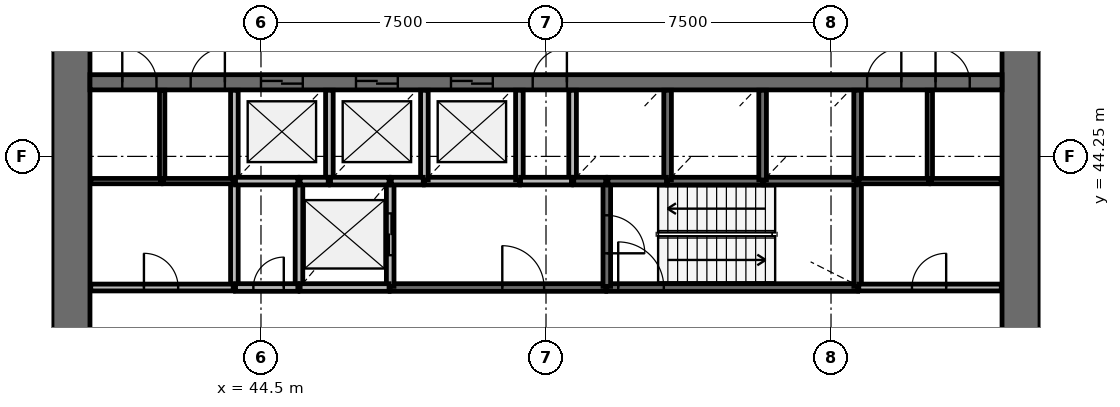
"""IFC4 building model, lengths in metres.
Left out: names, types, materials, properties, quantities, classifications, styles, units other than length and angle.
Written with IfcOpenShell. Run it as: python <this file> out.ifc"""

import sys

from ifc_helpers import new_model, si_unit, direction, frame, frame_2d, origin, place, context, subcontext, project, spatial, rectangle, extrude, source, transform, mapped, element, fill, save


model = new_model("IFC4")
c1 = context("Model", 3, precision=1e-05, world=origin(), true_north=direction((0.0, 1.0)))
c2 = subcontext(c1, "Body", "Model", "MODEL_VIEW")
j1 = project(units=[si_unit("LENGTHUNIT", "METRE"), si_unit("PLANEANGLEUNIT", "RADIAN")], contexts=[c1])
p1 = place(None, origin())
s1 = spatial("IfcSite", under=j1, at=p1, CompositionType="ELEMENT")
p2 = place(p1, origin())
s2 = spatial("IfcBuilding", under=s1, at=p2, CompositionType="ELEMENT")
p3 = place(p2, frame((0.0, 0.0, 27.0)))
s3 = spatial("IfcBuildingStorey", under=s2, at=p3, CompositionType="ELEMENT", Elevation=27.0)
p4 = place(p3, frame((64.5, 38.0, 0.0), z_axis=(0.0, 0.0, 1.0), x_axis=(0.0, 1.0, 0.0)))
e1 = element("IfcWall", 1, at=p4, inside=s3, PredefinedType="SHEAR", context=c2, shape_type="SweptSolid", body=[
    extrude(rectangle(XDim=20.0, YDim=1.0, at=frame_2d((10.0, 0.0))), origin(), (0.0, 0.0, 1.0), 4.4),
])
p5 = place(p4, frame((9.1, 0.0, 0.0)))
e2 = element("IfcOpeningElement", 2, at=p5, cuts=e1, PredefinedType="OPENING", context=c2, shape_type="SweptSolid", body=[
    extrude(rectangle(XDim=1.8, YDim=2.1, at=frame_2d((0.9, 1.05))), frame((0.0, 0.51, 0.0), z_axis=(0.0, -1.0, 0.0), x_axis=(1.0, 0.0, 0.0)), (0.0, 0.0, 1.0), 1.02),
])
p6 = place(p3, frame((39.5, 58.0, 0.0), z_axis=(0.0, 0.0, 1.0), x_axis=(0.0, -1.0, 0.0)))
e3 = element("IfcWall", 3, at=p6, inside=s3, PredefinedType="SHEAR", context=c2, shape_type="SweptSolid", body=[
    extrude(rectangle(XDim=20.0, YDim=1.0, at=frame_2d((10.0, 0.0))), origin(), (0.0, 0.0, 1.0), 4.4),
])
p7 = place(p6, frame((9.1, 0.0, 0.0)))
e4 = element("IfcOpeningElement", 4, at=p7, cuts=e3, PredefinedType="OPENING", context=c2, shape_type="SweptSolid", body=[
    extrude(rectangle(XDim=1.8, YDim=2.1, at=frame_2d((0.9, 1.05))), frame((0.0, 0.51, 0.0), z_axis=(0.0, -1.0, 0.0), x_axis=(1.0, 0.0, 0.0)), (0.0, 0.0, 1.0), 1.02),
])
p8 = place(p3, frame((40.0, 46.2, 0.0), z_axis=(0.0, 0.0, 1.0), x_axis=(1.0, 0.0, 0.0)))
e5 = element("IfcWall", 5, at=p8, inside=s3, PredefinedType="SHEAR", context=c2, shape_type="SweptSolid", body=[
    extrude(rectangle(XDim=24.0, YDim=0.4, at=frame_2d((12.0, 0.0))), origin(), (0.0, 0.0, 1.0), 4.4),
])
p9 = place(p8, frame((4.5, 0.0, 0.0)))
e6 = element("IfcOpeningElement", 6, at=p9, cuts=e5, PredefinedType="OPENING", context=c2, shape_type="SweptSolid", body=[
    extrude(rectangle(XDim=1.1, YDim=2.1, at=frame_2d((0.55, 1.05))), frame((0.0, 0.21, 0.0), z_axis=(0.0, -1.0, 0.0), x_axis=(1.0, 0.0, 0.0)), (0.0, 0.0, 1.0), 0.42),
])
p10 = place(p8, frame((7.0, 0.0, 0.0)))
e7 = element("IfcOpeningElement", 7, at=p10, cuts=e5, PredefinedType="OPENING", context=c2, shape_type="SweptSolid", body=[
    extrude(rectangle(XDim=1.1, YDim=2.1, at=frame_2d((0.55, 1.05))), frame((0.0, 0.21, 0.0), z_axis=(0.0, -1.0, 0.0), x_axis=(1.0, 0.0, 0.0)), (0.0, 0.0, 1.0), 0.42),
])
p11 = place(p8, frame((9.5, 0.0, 0.0)))
e8 = element("IfcOpeningElement", 8, at=p11, cuts=e5, PredefinedType="OPENING", context=c2, shape_type="SweptSolid", body=[
    extrude(rectangle(XDim=1.1, YDim=2.1, at=frame_2d((0.55, 1.05))), frame((0.0, 0.21, 0.0), z_axis=(0.0, -1.0, 0.0), x_axis=(1.0, 0.0, 0.0)), (0.0, 0.0, 1.0), 0.42),
])
p12 = place(p8, frame((20.45, 0.0, 0.0)))
e9 = element("IfcOpeningElement", 9, at=p12, cuts=e5, PredefinedType="OPENING", context=c2, shape_type="SweptSolid", body=[
    extrude(rectangle(XDim=0.9, YDim=2.1, at=frame_2d((0.45, 1.05))), frame((0.0, 0.21, 0.0), z_axis=(0.0, -1.0, 0.0), x_axis=(1.0, 0.0, 0.0)), (0.0, 0.0, 1.0), 0.42),
])
p13 = place(p8, frame((22.25, 0.0, 0.0)))
e10 = element("IfcOpeningElement", 10, at=p13, cuts=e5, PredefinedType="OPENING", context=c2, shape_type="SweptSolid", body=[
    extrude(rectangle(XDim=0.9, YDim=2.1, at=frame_2d((0.45, 1.05))), frame((0.0, 0.21, 0.0), z_axis=(0.0, -1.0, 0.0), x_axis=(1.0, 0.0, 0.0)), (0.0, 0.0, 1.0), 0.42),
])
p14 = place(p8, frame((0.85, 0.0, 0.0)))
e11 = element("IfcOpeningElement", 11, at=p14, cuts=e5, PredefinedType="OPENING", context=c2, shape_type="SweptSolid", body=[
    extrude(rectangle(XDim=0.9, YDim=2.1, at=frame_2d((0.45, 1.05))), frame((0.0, 0.21, 0.0), z_axis=(0.0, -1.0, 0.0), x_axis=(1.0, 0.0, 0.0)), (0.0, 0.0, 1.0), 0.42),
])
p15 = place(p8, frame((2.65, 0.0, 0.0)))
e12 = element("IfcOpeningElement", 12, at=p15, cuts=e5, PredefinedType="OPENING", context=c2, shape_type="SweptSolid", body=[
    extrude(rectangle(XDim=0.9, YDim=2.1, at=frame_2d((0.45, 1.05))), frame((0.0, 0.21, 0.0), z_axis=(0.0, -1.0, 0.0), x_axis=(1.0, 0.0, 0.0)), (0.0, 0.0, 1.0), 0.42),
])
p16 = place(p8, frame((11.65, 0.0, 0.0)))
e13 = element("IfcOpeningElement", 13, at=p16, cuts=e5, PredefinedType="OPENING", context=c2, shape_type="SweptSolid", body=[
    extrude(rectangle(XDim=0.9, YDim=2.1, at=frame_2d((0.45, 1.05))), frame((0.0, 0.21, 0.0), z_axis=(0.0, -1.0, 0.0), x_axis=(1.0, 0.0, 0.0)), (0.0, 0.0, 1.0), 0.42),
])
p17 = place(p3, frame((53.6, 40.8, 0.0), z_axis=(0.0, 0.0, 1.0), x_axis=(1.0, 0.0, 0.0)))
e14 = element("IfcWall", 14, at=p17, inside=s3, PredefinedType="SOLIDWALL", context=c2, shape_type="SweptSolid", body=[
    extrude(rectangle(XDim=6.6, YDim=0.2, at=frame_2d((3.3, 0.0))), origin(), (0.0, 0.0, 1.0), 3.95),
])
p18 = place(p17, frame((0.3, 0.0, 0.0)))
e15 = element("IfcOpeningElement", 15, at=p18, cuts=e14, PredefinedType="OPENING", context=c2, shape_type="SweptSolid", body=[
    extrude(rectangle(XDim=1.2, YDim=2.1, at=frame_2d((0.6, 1.05))), frame((0.0, 0.11, 0.0), z_axis=(0.0, -1.0, 0.0), x_axis=(1.0, 0.0, 0.0)), (0.0, 0.0, 1.0), 0.22),
])
p19 = place(p3, frame((47.9, 40.8, 0.0), z_axis=(0.0, 0.0, 1.0), x_axis=(1.0, 0.0, 0.0)))
e16 = element("IfcWall", 16, at=p19, inside=s3, PredefinedType="SOLIDWALL", context=c2, shape_type="SweptSolid", body=[
    extrude(rectangle(XDim=5.67, YDim=0.2, at=frame_2d((2.835, 0.0))), origin(), (0.0, 0.0, 1.0), 3.95),
])
p20 = place(p19, frame((2.95, 0.0, 0.0)))
e17 = element("IfcOpeningElement", 17, at=p20, cuts=e16, PredefinedType="OPENING", context=c2, shape_type="SweptSolid", body=[
    extrude(rectangle(XDim=1.1, YDim=2.1, at=frame_2d((0.55, 1.05))), frame((0.0, 0.11, 0.0), z_axis=(0.0, -1.0, 0.0), x_axis=(1.0, 0.0, 0.0)), (0.0, 0.0, 1.0), 0.22),
])
for number, where, z_axis, x_axis in (
    (18, (43.8, 43.6, 0.0), (0.0, 0.0, 1.0), (0.0, -1.0, 0.0)),
    (19, (45.5, 43.6, 0.0), (0.0, 0.0, 1.0), (0.0, -1.0, 0.0)),
):
    element("IfcWall", number, at=place(p3, frame(where, z_axis=z_axis, x_axis=x_axis)), inside=s3, PredefinedType="SOLIDWALL", context=c2, shape_type="SweptSolid", body=[
        extrude(rectangle(XDim=2.8, YDim=0.2, at=frame_2d((1.4, 0.0))), origin(), (0.0, 0.0, 1.0), 3.95),
    ])
p21 = place(p3, frame((47.9, 40.83, 0.0), z_axis=(0.0, 0.0, 1.0), x_axis=(0.0, 1.0, 0.0)))
e20 = element("IfcWall", 20, at=p21, inside=s3, PredefinedType="SOLIDWALL", context=c2, shape_type="SweptSolid", body=[
    extrude(rectangle(XDim=2.77, YDim=0.2, at=frame_2d((1.385, 0.0))), origin(), (0.0, 0.0, 1.0), 3.95),
])
p22 = place(p21, frame((0.82, 0.0, 0.0)))
e21 = element("IfcOpeningElement", 21, at=p22, cuts=e20, PredefinedType="OPENING", context=c2, shape_type="SweptSolid", body=[
    extrude(rectangle(XDim=1.1, YDim=2.1, at=frame_2d((0.55, 1.05))), frame((0.0, 0.11, 0.0), z_axis=(0.0, -1.0, 0.0), x_axis=(1.0, 0.0, 0.0)), (0.0, 0.0, 1.0), 0.22),
])
p23 = place(p3, frame((60.2, 40.83, 0.0), z_axis=(0.0, 0.0, 1.0), x_axis=(0.0, 1.0, 0.0)))
e22 = element("IfcWall", 22, at=p23, inside=s3, PredefinedType="SOLIDWALL", context=c2, shape_type="SweptSolid", body=[
    extrude(rectangle(XDim=2.77, YDim=0.2, at=frame_2d((1.385, 0.0))), origin(), (0.0, 0.0, 1.0), 3.95),
])
p24 = place(p3, frame((53.6, 43.6, 0.0), z_axis=(0.0, 0.0, 1.0), x_axis=(0.0, -1.0, 0.0)))
e23 = element("IfcWall", 23, at=p24, inside=s3, PredefinedType="SOLIDWALL", context=c2, shape_type="SweptSolid", body=[
    extrude(rectangle(XDim=2.77, YDim=0.2, at=frame_2d((1.385, 0.0))), origin(), (0.0, 0.0, 1.0), 3.95),
])
p25 = place(p24, frame((0.9, 0.0, 0.0)))
e24 = element("IfcOpeningElement", 24, at=p25, cuts=e23, PredefinedType="OPENING", context=c2, shape_type="SweptSolid", body=[
    extrude(rectangle(XDim=1.0, YDim=2.1, at=frame_2d((0.5, 1.05))), frame((0.0, 0.11, 0.0), z_axis=(0.0, -1.0, 0.0), x_axis=(1.0, 0.0, 0.0)), (0.0, 0.0, 1.0), 0.22),
])
for number, where, z_axis, x_axis in (
    (25, (48.8, 43.6, 0.0), (0.0, 0.0, 1.0), (1.0, 0.0, 0.0)),
    (26, (55.2, 43.6, 0.0), (0.0, 0.0, 1.0), (1.0, 0.0, 0.0)),
):
    element("IfcWall", number, at=place(p3, frame(where, z_axis=z_axis, x_axis=x_axis)), inside=s3, PredefinedType="SOLIDWALL", context=c2, shape_type="SweptSolid", body=[
        extrude(rectangle(XDim=2.5, YDim=0.2, at=frame_2d((1.25, 0.0))), origin(), (0.0, 0.0, 1.0), 3.95),
    ])
p26 = place(p3, frame((57.73, 43.6, 0.0), z_axis=(0.0, 0.0, 1.0), x_axis=(1.0, 0.0, 0.0)))
e27 = element("IfcWall", 27, at=p26, inside=s3, PredefinedType="SOLIDWALL", context=c2, shape_type="SweptSolid", body=[
    extrude(rectangle(XDim=2.44, YDim=0.2, at=frame_2d((1.22, 0.0))), origin(), (0.0, 0.0, 1.0), 3.95),
])
p27 = place(p3, frame((45.53, 40.8, 0.0), z_axis=(0.0, 0.0, 1.0), x_axis=(1.0, 0.0, 0.0)))
e28 = element("IfcWall", 28, at=p27, inside=s3, PredefinedType="SOLIDWALL", context=c2, shape_type="SweptSolid", body=[
    extrude(rectangle(XDim=2.34, YDim=0.2, at=frame_2d((1.17, 0.0))), origin(), (0.0, 0.0, 1.0), 3.95),
])
p28 = place(p3, frame((43.8, 45.99, 0.0), z_axis=(0.0, 0.0, 1.0), x_axis=(0.0, -1.0, 0.0)))
e29 = element("IfcWall", 29, at=p28, inside=s3, PredefinedType="SOLIDWALL", context=c2, shape_type="SweptSolid", body=[
    extrude(rectangle(XDim=2.36, YDim=0.2, at=frame_2d((1.18, 0.0))), origin(), (0.0, 0.0, 1.0), 3.95),
])
p29 = place(p3, frame((46.3, 43.6, 0.0), z_axis=(0.0, 0.0, 1.0), x_axis=(0.0, 1.0, 0.0)))
e30 = element("IfcWall", 30, at=p29, inside=s3, PredefinedType="SOLIDWALL", context=c2, shape_type="SweptSolid", body=[
    extrude(rectangle(XDim=2.39, YDim=0.2, at=frame_2d((1.195, 0.0))), origin(), (0.0, 0.0, 1.0), 3.95),
])
for number, where, z_axis, x_axis in (
    (31, (48.8, 43.63, 0.0), (0.0, 0.0, 1.0), (0.0, 1.0, 0.0)),
    (32, (51.3, 43.63, 0.0), (0.0, 0.0, 1.0), (0.0, 1.0, 0.0)),
):
    element("IfcWall", number, at=place(p3, frame(where, z_axis=z_axis, x_axis=x_axis)), inside=s3, PredefinedType="SOLIDWALL", context=c2, shape_type="SweptSolid", body=[
        extrude(rectangle(XDim=2.36, YDim=0.2, at=frame_2d((1.18, 0.0))), origin(), (0.0, 0.0, 1.0), 3.95),
    ])
p30 = place(p3, frame((52.7, 45.99, 0.0), z_axis=(0.0, 0.0, 1.0), x_axis=(0.0, -1.0, 0.0)))
e33 = element("IfcWall", 33, at=p30, inside=s3, PredefinedType="SOLIDWALL", context=c2, shape_type="SweptSolid", body=[
    extrude(rectangle(XDim=2.39, YDim=0.2, at=frame_2d((1.195, 0.0))), origin(), (0.0, 0.0, 1.0), 3.95),
])
for number, where, z_axis, x_axis in (
    (34, (55.2, 43.63, 0.0), (0.0, 0.0, 1.0), (0.0, 1.0, 0.0)),
    (35, (57.7, 43.63, 0.0), (0.0, 0.0, 1.0), (0.0, 1.0, 0.0)),
    (36, (60.2, 43.63, 0.0), (0.0, 0.0, 1.0), (0.0, 1.0, 0.0)),
):
    element("IfcWall", number, at=place(p3, frame(where, z_axis=z_axis, x_axis=x_axis)), inside=s3, PredefinedType="SOLIDWALL", context=c2, shape_type="SweptSolid", body=[
        extrude(rectangle(XDim=2.36, YDim=0.2, at=frame_2d((1.18, 0.0))), origin(), (0.0, 0.0, 1.0), 3.95),
    ])
p31 = place(p3, frame((43.83, 43.6, 0.0), z_axis=(0.0, 0.0, 1.0), x_axis=(1.0, 0.0, 0.0)))
e37 = element("IfcWall", 37, at=p31, inside=s3, PredefinedType="SOLIDWALL", context=c2, shape_type="SweptSolid", body=[
    extrude(rectangle(XDim=1.64, YDim=0.2, at=frame_2d((0.82, 0.0))), origin(), (0.0, 0.0, 1.0), 3.95),
])
p32 = place(p3, frame((43.83, 40.8, 0.0), z_axis=(0.0, 0.0, 1.0), x_axis=(1.0, 0.0, 0.0)))
e38 = element("IfcWall", 38, at=p32, inside=s3, PredefinedType="SOLIDWALL", context=c2, shape_type="SweptSolid", body=[
    extrude(rectangle(XDim=1.64, YDim=0.2, at=frame_2d((0.82, 0.0))), origin(), (0.0, 0.0, 1.0), 3.95),
])
p33 = place(p32, frame((0.47, 0.0, 0.0)))
e39 = element("IfcOpeningElement", 39, at=p33, cuts=e38, PredefinedType="OPENING", context=c2, shape_type="SweptSolid", body=[
    extrude(rectangle(XDim=0.8, YDim=2.1, at=frame_2d((0.4, 1.05))), frame((0.0, 0.11, 0.0), z_axis=(0.0, -1.0, 0.0), x_axis=(1.0, 0.0, 0.0)), (0.0, 0.0, 1.0), 0.22),
])
for number, where, z_axis, x_axis in (
    (40, (46.33, 43.6, 0.0), (0.0, 0.0, 1.0), (1.0, 0.0, 0.0)),
    (41, (53.63, 43.6, 0.0), (0.0, 0.0, 1.0), (1.0, 0.0, 0.0)),
):
    element("IfcWall", number, at=place(p3, frame(where, z_axis=z_axis, x_axis=x_axis)), inside=s3, PredefinedType="SOLIDWALL", context=c2, shape_type="SweptSolid", body=[
        extrude(rectangle(XDim=1.54, YDim=0.2, at=frame_2d((0.77, 0.0))), origin(), (0.0, 0.0, 1.0), 3.95),
    ])
p34 = place(p3, frame((52.67, 43.6, 0.0), z_axis=(0.0, 0.0, 1.0), x_axis=(-1.0, 0.0, 0.0)))
e42 = element("IfcWall", 42, at=p34, inside=s3, PredefinedType="SOLIDWALL", context=c2, shape_type="SweptSolid", body=[
    extrude(rectangle(XDim=1.34, YDim=0.2, at=frame_2d((0.67, 0.0))), origin(), (0.0, 0.0, 1.0), 3.95),
])
for number, where, z_axis, x_axis in (
    (43, (47.93, 43.6, 0.0), (0.0, 0.0, 1.0), (1.0, 0.0, 0.0)),
    (44, (52.73, 43.6, 0.0), (0.0, 0.0, 1.0), (1.0, 0.0, 0.0)),
):
    element("IfcWall", number, at=place(p3, frame(where, z_axis=z_axis, x_axis=x_axis)), inside=s3, PredefinedType="SOLIDWALL", context=c2, shape_type="SweptSolid", body=[
        extrude(rectangle(XDim=0.84, YDim=0.2, at=frame_2d((0.42, 0.0))), origin(), (0.0, 0.0, 1.0), 3.95),
    ])
p35 = place(p3, frame((45.53, 43.6, 0.0), z_axis=(0.0, 0.0, 1.0), x_axis=(1.0, 0.0, 0.0)))
e45 = element("IfcWall", 45, at=p35, inside=s3, PredefinedType="SOLIDWALL", context=c2, shape_type="SweptSolid", body=[
    extrude(rectangle(XDim=0.74, YDim=0.2, at=frame_2d((0.37, 0.0))), origin(), (0.0, 0.0, 1.0), 3.95),
])
p36 = place(p3, frame((40.02, 40.8, 0.0), z_axis=(0.0, 0.0, 1.0), x_axis=(1.0, 0.0, 0.0)))
e46 = element("IfcWall", 46, at=p36, inside=s3, PredefinedType="PARTITIONING", context=c2, shape_type="SweptSolid", body=[
    extrude(rectangle(XDim=3.75, YDim=0.18, at=frame_2d((1.875, 0.0))), origin(), (0.0, 0.0, 1.0), 3.95),
])
p37 = place(p36, frame((1.4, 0.0, 0.0)))
e47 = element("IfcOpeningElement", 47, at=p37, cuts=e46, PredefinedType="OPENING", context=c2, shape_type="SweptSolid", body=[
    extrude(rectangle(XDim=0.9, YDim=2.1, at=frame_2d((0.45, 1.05))), frame((0.0, 0.1, 0.0), z_axis=(0.0, -1.0, 0.0), x_axis=(1.0, 0.0, 0.0)), (0.0, 0.0, 1.0), 0.2),
])
p38 = place(p3, frame((60.23, 40.8, 0.0), z_axis=(0.0, 0.0, 1.0), x_axis=(1.0, 0.0, 0.0)))
e48 = element("IfcWall", 48, at=p38, inside=s3, PredefinedType="PARTITIONING", context=c2, shape_type="SweptSolid", body=[
    extrude(rectangle(XDim=3.75, YDim=0.18, at=frame_2d((1.875, 0.0))), origin(), (0.0, 0.0, 1.0), 3.95),
])
p39 = place(p38, frame((1.4, 0.0, 0.0)))
e49 = element("IfcOpeningElement", 49, at=p39, cuts=e48, PredefinedType="OPENING", context=c2, shape_type="SweptSolid", body=[
    extrude(rectangle(XDim=0.9, YDim=2.1, at=frame_2d((0.45, 1.05))), frame((0.0, 0.1, 0.0), z_axis=(0.0, -1.0, 0.0), x_axis=(1.0, 0.0, 0.0)), (0.0, 0.0, 1.0), 0.2),
])
for number, where, z_axis, x_axis in (
    (50, (41.9, 43.6, 0.0), (0.0, 0.0, 1.0), (0.0, 1.0, 0.0)),
    (51, (62.1, 43.6, 0.0), (0.0, 0.0, 1.0), (0.0, 1.0, 0.0)),
):
    element("IfcWall", number, at=place(p3, frame(where, z_axis=z_axis, x_axis=x_axis)), inside=s3, PredefinedType="PARTITIONING", context=c2, shape_type="SweptSolid", body=[
        extrude(rectangle(XDim=2.39, YDim=0.14, at=frame_2d((1.195, 0.0))), origin(), (0.0, 0.0, 1.0), 3.05),
    ])
for number, where, z_axis, x_axis in (
    (52, (43.77, 43.6, 0.0), (0.0, 0.0, 1.0), (-1.0, 0.0, 0.0)),
    (53, (60.23, 43.6, 0.0), (0.0, 0.0, 1.0), (1.0, 0.0, 0.0)),
):
    element("IfcWall", number, at=place(p3, frame(where, z_axis=z_axis, x_axis=x_axis)), inside=s3, PredefinedType="PARTITIONING", context=c2, shape_type="SweptSolid", body=[
        extrude(rectangle(XDim=1.84, YDim=0.14, at=frame_2d((0.92, 0.0))), origin(), (0.0, 0.0, 1.0), 3.05),
    ])
for number, where, z_axis, x_axis in (
    (54, (41.87, 43.6, 0.0), (0.0, 0.0, 1.0), (-1.0, 0.0, 0.0)),
    (55, (62.13, 43.6, 0.0), (0.0, 0.0, 1.0), (1.0, 0.0, 0.0)),
):
    element("IfcWall", number, at=place(p3, frame(where, z_axis=z_axis, x_axis=x_axis)), inside=s3, PredefinedType="PARTITIONING", context=c2, shape_type="SweptSolid", body=[
        extrude(rectangle(XDim=1.85, YDim=0.14, at=frame_2d((0.925, 0.0))), origin(), (0.0, 0.0, 1.0), 3.05),
    ])
m1 = source(origin(), c2, "Body", "SweptSolid", [
    extrude(rectangle(XDim=1.1, YDim=2.1, at=frame_2d((0.55, 1.05))), frame((0.0, 0.025, 0.0), z_axis=(0.0, -1.0, 0.0), x_axis=(1.0, 0.0, 0.0)), (0.0, 0.0, 1.0), 0.05),
])
p40 = place(p9, origin())
e56 = element("IfcDoor", 56, at=p40, inside=s3, OperationType="DOUBLE_DOOR_SLIDING", PredefinedType="USERDEFINED", context=c2, shape_type="MappedRepresentation", body=[
    mapped(m1, transform((0.0, 0.0, 0.0), scale=1.0)),
])
fill(e6, e56)
p41 = place(p10, origin())
e57 = element("IfcDoor", 57, at=p41, inside=s3, OperationType="DOUBLE_DOOR_SLIDING", PredefinedType="USERDEFINED", context=c2, shape_type="MappedRepresentation", body=[
    mapped(m1, transform((0.0, 0.0, 0.0), scale=1.0)),
])
fill(e7, e57)
p42 = place(p11, origin())
e58 = element("IfcDoor", 58, at=p42, inside=s3, OperationType="DOUBLE_DOOR_SLIDING", PredefinedType="USERDEFINED", context=c2, shape_type="MappedRepresentation", body=[
    mapped(m1, transform((0.0, 0.0, 0.0), scale=1.0)),
])
fill(e8, e58)
p43 = place(p22, origin())
e59 = element("IfcDoor", 59, at=p43, inside=s3, OperationType="DOUBLE_DOOR_SLIDING", PredefinedType="USERDEFINED", context=c2, shape_type="MappedRepresentation", body=[
    mapped(m1, transform((0.0, 0.0, 0.0), scale=1.0)),
])
fill(e21, e59)
m2 = source(origin(), c2, "Body", "SweptSolid", [
    extrude(rectangle(XDim=1.2, YDim=2.1, at=frame_2d((0.6, 1.05))), frame((0.0, 0.025, 0.0), z_axis=(0.0, -1.0, 0.0), x_axis=(1.0, 0.0, 0.0)), (0.0, 0.0, 1.0), 0.05),
])
p44 = place(p18, origin())
e60 = element("IfcDoor", 60, at=p44, inside=s3, OperationType="SINGLE_SWING_LEFT", PredefinedType="DOOR", context=c2, shape_type="MappedRepresentation", body=[
    mapped(m2, transform((0.0, 0.0, 0.0), scale=1.0)),
])
fill(e15, e60)
m3 = source(origin(), c2, "Body", "SweptSolid", [
    extrude(rectangle(XDim=1.0, YDim=2.1, at=frame_2d((0.5, 1.05))), frame((0.0, 0.025, 0.0), z_axis=(0.0, -1.0, 0.0), x_axis=(1.0, 0.0, 0.0)), (0.0, 0.0, 1.0), 0.05),
])
p45 = place(p25, origin())
e61 = element("IfcDoor", 61, at=p45, inside=s3, OperationType="SINGLE_SWING_RIGHT", PredefinedType="DOOR", context=c2, shape_type="MappedRepresentation", body=[
    mapped(m3, transform((0.0, 0.0, 0.0), scale=1.0)),
])
fill(e24, e61)
m4 = source(origin(), c2, "Body", "SweptSolid", [
    extrude(rectangle(XDim=1.1, YDim=2.1, at=frame_2d((0.55, 1.05))), frame((0.0, 0.025, 0.0), z_axis=(0.0, -1.0, 0.0), x_axis=(1.0, 0.0, 0.0)), (0.0, 0.0, 1.0), 0.05),
])
p46 = place(p20, origin())
e62 = element("IfcDoor", 62, at=p46, inside=s3, OperationType="SINGLE_SWING_LEFT", PredefinedType="DOOR", context=c2, shape_type="MappedRepresentation", body=[
    mapped(m4, transform((0.0, 0.0, 0.0), scale=1.0)),
])
fill(e17, e62)
m5 = source(origin(), c2, "Body", "SweptSolid", [
    extrude(rectangle(XDim=0.8, YDim=2.1, at=frame_2d((0.4, 1.05))), frame((0.0, 0.025, 0.0), z_axis=(0.0, -1.0, 0.0), x_axis=(1.0, 0.0, 0.0)), (0.0, 0.0, 1.0), 0.05),
])
p47 = place(p33, origin())
e63 = element("IfcDoor", 63, at=p47, inside=s3, OperationType="SINGLE_SWING_RIGHT", PredefinedType="DOOR", context=c2, shape_type="MappedRepresentation", body=[
    mapped(m5, transform((0.0, 0.0, 0.0), scale=1.0)),
])
fill(e39, e63)
m6 = source(origin(), c2, "Body", "SweptSolid", [
    extrude(rectangle(XDim=0.9, YDim=2.1, at=frame_2d((0.45, 1.05))), frame((0.0, 0.025, 0.0), z_axis=(0.0, -1.0, 0.0), x_axis=(1.0, 0.0, 0.0)), (0.0, 0.0, 1.0), 0.05),
])
p48 = place(p37, origin())
e64 = element("IfcDoor", 64, at=p48, inside=s3, OperationType="SINGLE_SWING_LEFT", PredefinedType="DOOR", context=c2, shape_type="MappedRepresentation", body=[
    mapped(m6, transform((0.0, 0.0, 0.0), scale=1.0)),
])
fill(e47, e64)
p49 = place(p12, origin())
e65 = element("IfcDoor", 65, at=p49, inside=s3, OperationType="SINGLE_SWING_RIGHT", PredefinedType="DOOR", context=c2, shape_type="MappedRepresentation", body=[
    mapped(m6, transform((0.0, 0.0, 0.0), scale=1.0)),
])
fill(e9, e65)
p50 = place(p13, origin())
e66 = element("IfcDoor", 66, at=p50, inside=s3, OperationType="SINGLE_SWING_LEFT", PredefinedType="DOOR", context=c2, shape_type="MappedRepresentation", body=[
    mapped(m6, transform((0.0, 0.0, 0.0), scale=1.0)),
])
fill(e10, e66)
p51 = place(p39, origin())
e67 = element("IfcDoor", 67, at=p51, inside=s3, OperationType="SINGLE_SWING_RIGHT", PredefinedType="DOOR", context=c2, shape_type="MappedRepresentation", body=[
    mapped(m6, transform((0.0, 0.0, 0.0), scale=1.0)),
])
fill(e49, e67)
p52 = place(p14, origin())
e68 = element("IfcDoor", 68, at=p52, inside=s3, OperationType="SINGLE_SWING_LEFT", PredefinedType="DOOR", context=c2, shape_type="MappedRepresentation", body=[
    mapped(m6, transform((0.0, 0.0, 0.0), scale=1.0)),
])
fill(e11, e68)
p53 = place(p15, origin())
e69 = element("IfcDoor", 69, at=p53, inside=s3, OperationType="SINGLE_SWING_RIGHT", PredefinedType="DOOR", context=c2, shape_type="MappedRepresentation", body=[
    mapped(m6, transform((0.0, 0.0, 0.0), scale=1.0)),
])
fill(e12, e69)
p54 = place(p16, origin())
e70 = element("IfcDoor", 70, at=p54, inside=s3, OperationType="SINGLE_SWING_RIGHT", PredefinedType="DOOR", context=c2, shape_type="MappedRepresentation", body=[
    mapped(m6, transform((0.0, 0.0, 0.0), scale=1.0)),
])
fill(e13, e70)
save(model, sys.argv[1])
